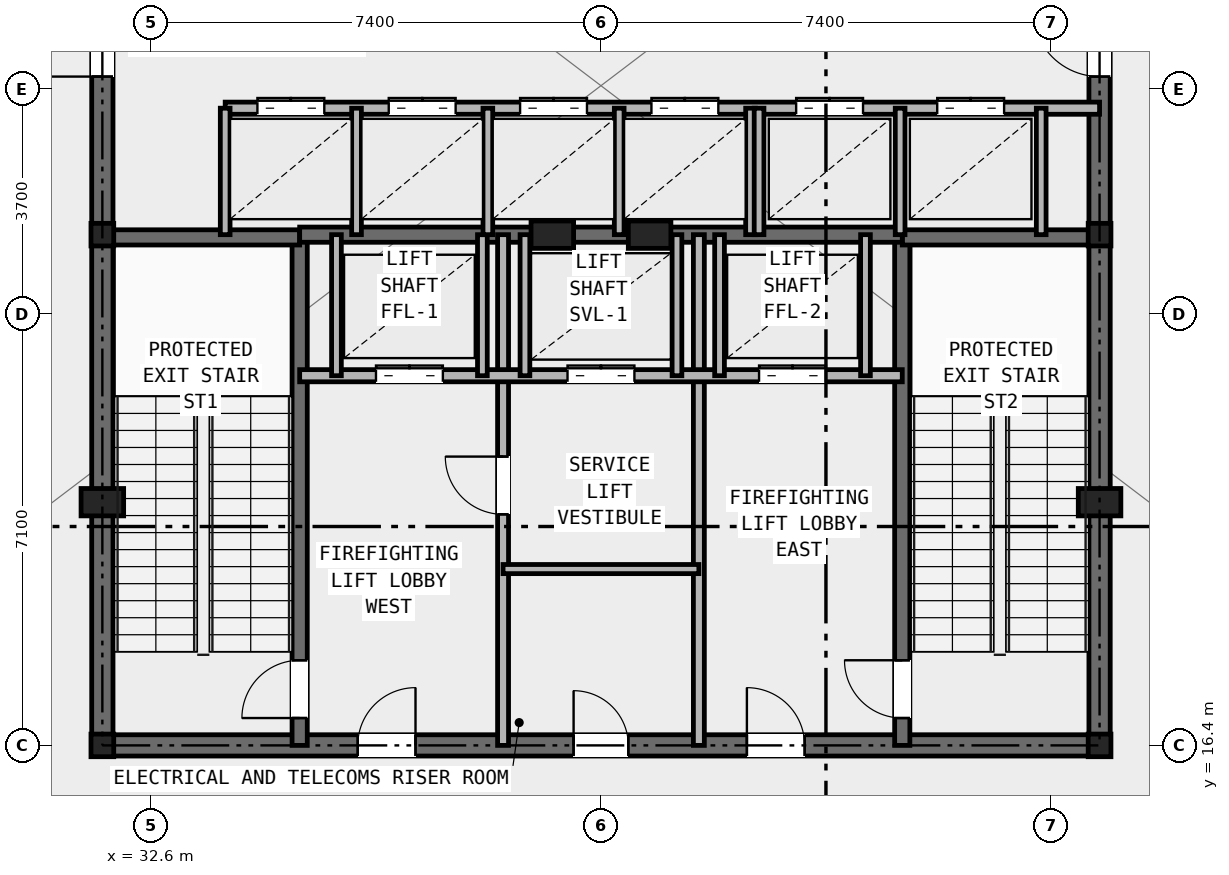
"""IFC4 building model, lengths in metres.
Left out: names, types, materials, properties, quantities, classifications, styles, units other than length and angle.
Written with IfcOpenShell. Run it as: python <this file> out.ifc"""

import sys

from ifc_helpers import new_model, si_unit, direction, frame, frame_2d, origin, origin_2d, place, context, subcontext, project, spatial, rectangle, i_section, extrude, element, fill, save


model = new_model("IFC4")
c1 = context("Model", 3, precision=1e-05, world=origin(), true_north=direction((0.0, 1.0)))
c2 = subcontext(c1, "Body", "Model", "MODEL_VIEW")
j1 = project(units=[si_unit("LENGTHUNIT", "METRE"), si_unit("PLANEANGLEUNIT", "RADIAN")], contexts=[c1])
p1 = place(None, origin())
s1 = spatial("IfcSite", under=j1, at=p1, CompositionType="ELEMENT")
p2 = place(p1, origin())
s2 = spatial("IfcBuilding", under=s1, at=p2, CompositionType="ELEMENT")
p3 = place(p2, origin())
s3 = spatial("IfcBuildingStorey", under=s2, at=p3, CompositionType="ELEMENT", Elevation=0.0)
for number, where, z_axis, x_axis in (
    (1, (31.8, 16.4, 0.0), (0.0, 0.0, 1.0), (1.0, 0.0, 0.0)),
    (2, (48.2, 16.4, 0.0), (0.0, 0.0, 1.0), (1.0, 0.0, 0.0)),
    (3, (31.8, 24.8, 0.0), (0.0, 0.0, 1.0), (1.0, 0.0, 0.0)),
    (4, (48.2, 24.8, 0.0), (0.0, 0.0, 1.0), (1.0, 0.0, 0.0)),
):
    element("IfcColumn", number, at=place(p3, frame(where, z_axis=z_axis, x_axis=x_axis)), inside=s3, PredefinedType="COLUMN", context=c2, shape_type="SweptSolid", body=[
        extrude(i_section(OverallWidth=0.374, OverallDepth=0.372, WebThickness=0.016, FlangeThickness=0.026, at=origin_2d()), origin(), (0.0, 0.0, 1.0), 5.5),
    ])
for number, where, z_axis, x_axis in (
    (5, (31.8, 20.4, 0.0), (0.0, 0.0, 1.0), (1.0, 0.0, 0.0)),
    (6, (48.2, 20.4, 0.0), (0.0, 0.0, 1.0), (1.0, 0.0, 0.0)),
    (7, (39.2, 24.8, 0.0), (0.0, 0.0, 1.0), (1.0, 0.0, 0.0)),
    (8, (40.8, 24.8, 0.0), (0.0, 0.0, 1.0), (1.0, 0.0, 0.0)),
):
    element("IfcColumn", number, at=place(p3, frame(where, z_axis=z_axis, x_axis=x_axis)), inside=s3, PredefinedType="PILASTER", context=c2, shape_type="SweptSolid", body=[
        extrude(rectangle(XDim=0.7, YDim=0.45, at=origin_2d()), origin(), (0.0, 0.0, 1.0), 5.5),
    ])
p4 = place(p3, frame((31.8, 16.4, 0.0), z_axis=(0.0, 0.0, 1.0), x_axis=(1.0, 0.0, 0.0)))
e9 = element("IfcWall", 9, at=p4, inside=s3, PredefinedType="SHEAR", context=c2, shape_type="SweptSolid", body=[
    extrude(rectangle(XDim=16.4, YDim=0.35, at=frame_2d((8.2, 0.0))), origin(), (0.0, 0.0, 1.0), 5.22),
])
p5 = place(p4, frame((7.75, 0.0, 0.0)))
e10 = element("IfcOpeningElement", 10, at=p5, cuts=e9, PredefinedType="OPENING", context=c2, shape_type="SweptSolid", body=[
    extrude(rectangle(XDim=0.9, YDim=2.1, at=frame_2d((0.45, 1.05))), frame((0.0, 0.185, 0.0), z_axis=(0.0, -1.0, 0.0), x_axis=(1.0, 0.0, 0.0)), (0.0, 0.0, 1.0), 0.37),
])
p6 = place(p4, frame((4.2, 0.0, 0.0)))
e11 = element("IfcOpeningElement", 11, at=p6, cuts=e9, PredefinedType="OPENING", context=c2, shape_type="SweptSolid", body=[
    extrude(rectangle(XDim=0.95, YDim=2.1, at=frame_2d((0.475, 1.05))), frame((0.0, 0.185, 0.0), z_axis=(0.0, -1.0, 0.0), x_axis=(1.0, 0.0, 0.0)), (0.0, 0.0, 1.0), 0.37),
])
p7 = place(p4, frame((10.6, 0.0, 0.0)))
e12 = element("IfcOpeningElement", 12, at=p7, cuts=e9, PredefinedType="OPENING", context=c2, shape_type="SweptSolid", body=[
    extrude(rectangle(XDim=0.95, YDim=2.1, at=frame_2d((0.475, 1.05))), frame((0.0, 0.185, 0.0), z_axis=(0.0, -1.0, 0.0), x_axis=(1.0, 0.0, 0.0)), (0.0, 0.0, 1.0), 0.37),
])
p8 = place(p3, frame((31.8, 16.4, 0.0), z_axis=(0.0, 0.0, 1.0), x_axis=(0.0, 1.0, 0.0)))
e13 = element("IfcWall", 13, at=p8, inside=s3, PredefinedType="SHEAR", context=c2, shape_type="SweptSolid", body=[
    extrude(rectangle(XDim=14.8, YDim=0.35, at=frame_2d((7.4, 0.0))), origin(), (0.0, 0.0, 1.0), 5.22),
])
p9 = place(p8, frame((11.0, 0.0, 0.0)))
e14 = element("IfcOpeningElement", 14, at=p9, cuts=e13, PredefinedType="OPENING", context=c2, shape_type="SweptSolid", body=[
    extrude(rectangle(XDim=1.1, YDim=2.15, at=frame_2d((0.55, 1.075))), frame((0.0, 0.185, 0.0), z_axis=(0.0, -1.0, 0.0), x_axis=(1.0, 0.0, 0.0)), (0.0, 0.0, 1.0), 0.37),
])
p10 = place(p3, frame((48.2, 16.4, 0.0), z_axis=(0.0, 0.0, 1.0), x_axis=(0.0, 1.0, 0.0)))
e15 = element("IfcWall", 15, at=p10, inside=s3, PredefinedType="SHEAR", context=c2, shape_type="SweptSolid", body=[
    extrude(rectangle(XDim=14.8, YDim=0.35, at=frame_2d((7.4, 0.0))), origin(), (0.0, 0.0, 1.0), 5.22),
])
p11 = place(p10, frame((11.0, 0.0, 0.0)))
e16 = element("IfcOpeningElement", 16, at=p11, cuts=e15, PredefinedType="OPENING", context=c2, shape_type="SweptSolid", body=[
    extrude(rectangle(XDim=1.1, YDim=2.15, at=frame_2d((0.55, 1.075))), frame((0.0, 0.185, 0.0), z_axis=(0.0, -1.0, 0.0), x_axis=(1.0, 0.0, 0.0)), (0.0, 0.0, 1.0), 0.37),
])
p12 = place(p3, frame((35.045, 16.4, 0.0), z_axis=(0.0, 0.0, 1.0), x_axis=(0.0, 1.0, 0.0)))
e17 = element("IfcWall", 17, at=p12, inside=s3, PredefinedType="SHEAR", context=c2, shape_type="SweptSolid", body=[
    extrude(rectangle(XDim=8.4, YDim=0.25, at=frame_2d((4.2, 0.0))), origin(), (0.0, 0.0, 1.0), 5.22),
])
p13 = place(p12, frame((0.45, 0.0, 0.0)))
e18 = element("IfcOpeningElement", 18, at=p13, cuts=e17, PredefinedType="OPENING", context=c2, shape_type="SweptSolid", body=[
    extrude(rectangle(XDim=0.95, YDim=2.1, at=frame_2d((0.475, 1.05))), frame((0.0, 0.135, 0.0), z_axis=(0.0, -1.0, 0.0), x_axis=(1.0, 0.0, 0.0)), (0.0, 0.0, 1.0), 0.27),
])
p14 = place(p3, frame((31.8, 24.755, 0.0), z_axis=(0.0, 0.0, 1.0), x_axis=(1.0, 0.0, 0.0)))
e19 = element("IfcWall", 19, at=p14, inside=s3, PredefinedType="SHEAR", context=c2, shape_type="SweptSolid", body=[
    extrude(rectangle(XDim=3.245, YDim=0.25, at=frame_2d((1.623, 0.0))), origin(), (0.0, 0.0, 1.0), 5.22),
])
p15 = place(p3, frame((44.955, 16.4, 0.0), z_axis=(0.0, 0.0, 1.0), x_axis=(0.0, 1.0, 0.0)))
e20 = element("IfcWall", 20, at=p15, inside=s3, PredefinedType="SHEAR", context=c2, shape_type="SweptSolid", body=[
    extrude(rectangle(XDim=8.4, YDim=0.25, at=frame_2d((4.2, 0.0))), origin(), (0.0, 0.0, 1.0), 5.22),
])
p16 = place(p15, frame((0.45, 0.0, 0.0)))
e21 = element("IfcOpeningElement", 21, at=p16, cuts=e20, PredefinedType="OPENING", context=c2, shape_type="SweptSolid", body=[
    extrude(rectangle(XDim=0.95, YDim=2.1, at=frame_2d((0.475, 1.05))), frame((0.0, 0.135, 0.0), z_axis=(0.0, -1.0, 0.0), x_axis=(1.0, 0.0, 0.0)), (0.0, 0.0, 1.0), 0.27),
])
p17 = place(p3, frame((44.955, 24.755, 0.0), z_axis=(0.0, 0.0, 1.0), x_axis=(1.0, 0.0, 0.0)))
e22 = element("IfcWall", 22, at=p17, inside=s3, PredefinedType="SHEAR", context=c2, shape_type="SweptSolid", body=[
    extrude(rectangle(XDim=3.245, YDim=0.25, at=frame_2d((1.623, 0.0))), origin(), (0.0, 0.0, 1.0), 5.22),
])
p18 = place(p3, frame((35.045, 24.8, 0.0), z_axis=(0.0, 0.0, 1.0), x_axis=(1.0, 0.0, 0.0)))
e23 = element("IfcWall", 23, at=p18, inside=s3, PredefinedType="SHEAR", context=c2, shape_type="SweptSolid", body=[
    extrude(rectangle(XDim=9.91, YDim=0.25, at=frame_2d((4.955, 0.0))), origin(), (0.0, 0.0, 1.0), 5.22),
])
p19 = place(p3, frame((38.39, 16.4, 0.0), z_axis=(0.0, 0.0, 1.0), x_axis=(0.0, 1.0, 0.0)))
e24 = element("IfcWall", 24, at=p19, inside=s3, PredefinedType="PARTITIONING", context=c2, shape_type="SweptSolid", body=[
    extrude(rectangle(XDim=8.4, YDim=0.18, at=frame_2d((4.2, 0.0))), origin(), (0.0, 0.0, 1.0), 4.671),
])
p20 = place(p19, frame((3.8, 0.0, 0.0)))
e25 = element("IfcOpeningElement", 25, at=p20, cuts=e24, PredefinedType="OPENING", context=c2, shape_type="SweptSolid", body=[
    extrude(rectangle(XDim=0.95, YDim=2.1, at=frame_2d((0.475, 1.05))), frame((0.0, 0.1, 0.0), z_axis=(0.0, -1.0, 0.0), x_axis=(1.0, 0.0, 0.0)), (0.0, 0.0, 1.0), 0.2),
])
p21 = place(p3, frame((41.61, 16.4, 0.0), z_axis=(0.0, 0.0, 1.0), x_axis=(0.0, 1.0, 0.0)))
e26 = element("IfcWall", 26, at=p21, inside=s3, PredefinedType="PARTITIONING", context=c2, shape_type="SweptSolid", body=[
    extrude(rectangle(XDim=8.4, YDim=0.18, at=frame_2d((4.2, 0.0))), origin(), (0.0, 0.0, 1.0), 4.671),
])
p22 = place(p3, frame((35.045, 22.48, 0.0), z_axis=(0.0, 0.0, 1.0), x_axis=(1.0, 0.0, 0.0)))
e27 = element("IfcWall", 27, at=p22, inside=s3, PredefinedType="SOLIDWALL", context=c2, shape_type="SweptSolid", body=[
    extrude(rectangle(XDim=9.91, YDim=0.2, at=frame_2d((4.955, 0.0))), origin(), (0.0, 0.0, 1.0), 5.22),
])
p23 = place(p22, frame((1.255, 0.0, 0.0)))
e28 = element("IfcOpeningElement", 28, at=p23, cuts=e27, PredefinedType="OPENING", context=c2, shape_type="SweptSolid", body=[
    extrude(rectangle(XDim=1.1, YDim=2.15, at=frame_2d((0.55, 1.075))), frame((0.0, 0.11, 0.0), z_axis=(0.0, -1.0, 0.0), x_axis=(1.0, 0.0, 0.0)), (0.0, 0.0, 1.0), 0.22),
])
p24 = place(p22, frame((7.555, 0.0, 0.0)))
e29 = element("IfcOpeningElement", 29, at=p24, cuts=e27, PredefinedType="OPENING", context=c2, shape_type="SweptSolid", body=[
    extrude(rectangle(XDim=1.1, YDim=2.15, at=frame_2d((0.55, 1.075))), frame((0.0, 0.11, 0.0), z_axis=(0.0, -1.0, 0.0), x_axis=(1.0, 0.0, 0.0)), (0.0, 0.0, 1.0), 0.22),
])
p25 = place(p22, frame((4.405, 0.0, 0.0)))
e30 = element("IfcOpeningElement", 30, at=p25, cuts=e27, PredefinedType="OPENING", context=c2, shape_type="SweptSolid", body=[
    extrude(rectangle(XDim=1.1, YDim=2.15, at=frame_2d((0.55, 1.075))), frame((0.0, 0.11, 0.0), z_axis=(0.0, -1.0, 0.0), x_axis=(1.0, 0.0, 0.0)), (0.0, 0.0, 1.0), 0.22),
])
p26 = place(p3, frame((38.39, 19.3, 0.0), z_axis=(0.0, 0.0, 1.0), x_axis=(1.0, 0.0, 0.0)))
e31 = element("IfcWall", 31, at=p26, inside=s3, PredefinedType="PARTITIONING", context=c2, shape_type="SweptSolid", body=[
    extrude(rectangle(XDim=3.22, YDim=0.15, at=frame_2d((1.61, 0.0))), origin(), (0.0, 0.0, 1.0), 5.22),
])
for number, where, z_axis, x_axis in (
    (32, (35.65, 22.48, 0.0), (0.0, 0.0, 1.0), (0.0, 1.0, 0.0)),
    (33, (38.05, 22.48, 0.0), (0.0, 0.0, 1.0), (0.0, 1.0, 0.0)),
    (34, (41.95, 22.48, 0.0), (0.0, 0.0, 1.0), (0.0, 1.0, 0.0)),
    (35, (44.35, 22.48, 0.0), (0.0, 0.0, 1.0), (0.0, 1.0, 0.0)),
    (36, (38.75, 22.48, 0.0), (0.0, 0.0, 1.0), (0.0, 1.0, 0.0)),
    (37, (41.25, 22.48, 0.0), (0.0, 0.0, 1.0), (0.0, 1.0, 0.0)),
):
    element("IfcWall", number, at=place(p3, frame(where, z_axis=z_axis, x_axis=x_axis)), inside=s3, PredefinedType="SOLIDWALL", context=c2, shape_type="SweptSolid", body=[
        extrude(rectangle(XDim=2.32, YDim=0.16, at=frame_2d((1.16, 0.0))), origin(), (0.0, 0.0, 1.0), 5.22),
    ])
p27 = place(p3, frame((33.82, 26.88, 0.0), z_axis=(0.0, 0.0, 1.0), x_axis=(1.0, 0.0, 0.0)))
e38 = element("IfcWall", 38, at=p27, inside=s3, PredefinedType="SOLIDWALL", context=c2, shape_type="SweptSolid", body=[
    extrude(rectangle(XDim=14.38, YDim=0.2, at=frame_2d((7.19, 0.0))), origin(), (0.0, 0.0, 1.0), 4.671),
])
p28 = place(p27, frame((0.53, 0.0, 0.0)))
e39 = element("IfcOpeningElement", 39, at=p28, cuts=e38, PredefinedType="OPENING", context=c2, shape_type="SweptSolid", body=[
    extrude(rectangle(XDim=1.1, YDim=2.15, at=frame_2d((0.55, 1.075))), frame((0.0, 0.11, 0.0), z_axis=(0.0, -1.0, 0.0), x_axis=(1.0, 0.0, 0.0)), (0.0, 0.0, 1.0), 0.22),
])
p29 = place(p27, frame((2.69, 0.0, 0.0)))
e40 = element("IfcOpeningElement", 40, at=p29, cuts=e38, PredefinedType="OPENING", context=c2, shape_type="SweptSolid", body=[
    extrude(rectangle(XDim=1.1, YDim=2.15, at=frame_2d((0.55, 1.075))), frame((0.0, 0.11, 0.0), z_axis=(0.0, -1.0, 0.0), x_axis=(1.0, 0.0, 0.0)), (0.0, 0.0, 1.0), 0.22),
])
p30 = place(p27, frame((4.85, 0.0, 0.0)))
e41 = element("IfcOpeningElement", 41, at=p30, cuts=e38, PredefinedType="OPENING", context=c2, shape_type="SweptSolid", body=[
    extrude(rectangle(XDim=1.1, YDim=2.15, at=frame_2d((0.55, 1.075))), frame((0.0, 0.11, 0.0), z_axis=(0.0, -1.0, 0.0), x_axis=(1.0, 0.0, 0.0)), (0.0, 0.0, 1.0), 0.22),
])
p31 = place(p27, frame((7.01, 0.0, 0.0)))
e42 = element("IfcOpeningElement", 42, at=p31, cuts=e38, PredefinedType="OPENING", context=c2, shape_type="SweptSolid", body=[
    extrude(rectangle(XDim=1.1, YDim=2.15, at=frame_2d((0.55, 1.075))), frame((0.0, 0.11, 0.0), z_axis=(0.0, -1.0, 0.0), x_axis=(1.0, 0.0, 0.0)), (0.0, 0.0, 1.0), 0.22),
])
p32 = place(p27, frame((9.39, 0.0, 0.0)))
e43 = element("IfcOpeningElement", 43, at=p32, cuts=e38, PredefinedType="OPENING", context=c2, shape_type="SweptSolid", body=[
    extrude(rectangle(XDim=1.1, YDim=2.15, at=frame_2d((0.55, 1.075))), frame((0.0, 0.11, 0.0), z_axis=(0.0, -1.0, 0.0), x_axis=(1.0, 0.0, 0.0)), (0.0, 0.0, 1.0), 0.22),
])
p33 = place(p27, frame((11.71, 0.0, 0.0)))
e44 = element("IfcOpeningElement", 44, at=p33, cuts=e38, PredefinedType="OPENING", context=c2, shape_type="SweptSolid", body=[
    extrude(rectangle(XDim=1.1, YDim=2.15, at=frame_2d((0.55, 1.075))), frame((0.0, 0.11, 0.0), z_axis=(0.0, -1.0, 0.0), x_axis=(1.0, 0.0, 0.0)), (0.0, 0.0, 1.0), 0.22),
])
for number, where, z_axis, x_axis in (
    (45, (33.82, 24.8, 0.0), (0.0, 0.0, 1.0), (0.0, 1.0, 0.0)),
    (46, (35.98, 24.8, 0.0), (0.0, 0.0, 1.0), (0.0, 1.0, 0.0)),
    (47, (38.14, 24.8, 0.0), (0.0, 0.0, 1.0), (0.0, 1.0, 0.0)),
    (48, (40.3, 24.8, 0.0), (0.0, 0.0, 1.0), (0.0, 1.0, 0.0)),
    (49, (42.46, 24.8, 0.0), (0.0, 0.0, 1.0), (0.0, 1.0, 0.0)),
    (50, (42.6, 24.8, 0.0), (0.0, 0.0, 1.0), (0.0, 1.0, 0.0)),
    (51, (44.92, 24.8, 0.0), (0.0, 0.0, 1.0), (0.0, 1.0, 0.0)),
    (52, (47.24, 24.8, 0.0), (0.0, 0.0, 1.0), (0.0, 1.0, 0.0)),
):
    element("IfcWall", number, at=place(p3, frame(where, z_axis=z_axis, x_axis=x_axis)), inside=s3, PredefinedType="SOLIDWALL", context=c2, shape_type="SweptSolid", body=[
        extrude(rectangle(XDim=2.08, YDim=0.16, at=frame_2d((1.04, 0.0))), origin(), (0.0, 0.0, 1.0), 5.22),
    ])
p34 = place(p5, origin())
e53 = element("IfcDoor", 53, at=p34, inside=s3, OperationType="SINGLE_SWING_LEFT", PredefinedType="DOOR", context=c2, shape_type="SweptSolid", body=[
    extrude(rectangle(XDim=0.9, YDim=2.1, at=frame_2d((0.45, 1.05))), frame((0.0, 0.025, 0.0), z_axis=(0.0, -1.0, 0.0), x_axis=(1.0, 0.0, 0.0)), (0.0, 0.0, 1.0), 0.05),
])
fill(e10, e53)
p35 = place(p20, origin())
e54 = element("IfcDoor", 54, at=p35, inside=s3, OperationType="SINGLE_SWING_RIGHT", PredefinedType="DOOR", context=c2, shape_type="SweptSolid", body=[
    extrude(rectangle(XDim=0.95, YDim=2.1, at=frame_2d((0.475, 1.05))), frame((0.0, 0.025, 0.0), z_axis=(0.0, -1.0, 0.0), x_axis=(1.0, 0.0, 0.0)), (0.0, 0.0, 1.0), 0.05),
])
fill(e25, e54)
p36 = place(p13, origin())
e55 = element("IfcDoor", 55, at=p36, inside=s3, OperationType="SINGLE_SWING_LEFT", PredefinedType="DOOR", context=c2, shape_type="SweptSolid", body=[
    extrude(rectangle(XDim=0.95, YDim=2.1, at=frame_2d((0.475, 1.05))), frame((0.0, 0.025, 0.0), z_axis=(0.0, -1.0, 0.0), x_axis=(1.0, 0.0, 0.0)), (0.0, 0.0, 1.0), 0.05),
])
fill(e18, e55)
p37 = place(p16, origin())
e56 = element("IfcDoor", 56, at=p37, inside=s3, OperationType="SINGLE_SWING_RIGHT", PredefinedType="DOOR", context=c2, shape_type="SweptSolid", body=[
    extrude(rectangle(XDim=0.95, YDim=2.1, at=frame_2d((0.475, 1.05))), frame((0.0, 0.025, 0.0), z_axis=(0.0, -1.0, 0.0), x_axis=(1.0, 0.0, 0.0)), (0.0, 0.0, 1.0), 0.05),
])
fill(e21, e56)
p38 = place(p6, origin())
e57 = element("IfcDoor", 57, at=p38, inside=s3, OperationType="SINGLE_SWING_RIGHT", PredefinedType="DOOR", context=c2, shape_type="SweptSolid", body=[
    extrude(rectangle(XDim=0.95, YDim=2.1, at=frame_2d((0.475, 1.05))), frame((0.0, 0.025, 0.0), z_axis=(0.0, -1.0, 0.0), x_axis=(1.0, 0.0, 0.0)), (0.0, 0.0, 1.0), 0.05),
])
fill(e11, e57)
p39 = place(p7, origin())
e58 = element("IfcDoor", 58, at=p39, inside=s3, OperationType="SINGLE_SWING_LEFT", PredefinedType="DOOR", context=c2, shape_type="SweptSolid", body=[
    extrude(rectangle(XDim=0.95, YDim=2.1, at=frame_2d((0.475, 1.05))), frame((0.0, 0.025, 0.0), z_axis=(0.0, -1.0, 0.0), x_axis=(1.0, 0.0, 0.0)), (0.0, 0.0, 1.0), 0.05),
])
fill(e12, e58)
p40 = place(p23, origin())
e59 = element("IfcDoor", 59, at=p40, inside=s3, OperationType="DOUBLE_DOOR_SLIDING", PredefinedType="DOOR", context=c2, shape_type="SweptSolid", body=[
    extrude(rectangle(XDim=1.1, YDim=2.15, at=frame_2d((0.55, 1.075))), frame((0.0, 0.025, 0.0), z_axis=(0.0, -1.0, 0.0), x_axis=(1.0, 0.0, 0.0)), (0.0, 0.0, 1.0), 0.05),
])
fill(e28, e59)
p41 = place(p24, origin())
e60 = element("IfcDoor", 60, at=p41, inside=s3, OperationType="DOUBLE_DOOR_SLIDING", PredefinedType="DOOR", context=c2, shape_type="SweptSolid", body=[
    extrude(rectangle(XDim=1.1, YDim=2.15, at=frame_2d((0.55, 1.075))), frame((0.0, 0.025, 0.0), z_axis=(0.0, -1.0, 0.0), x_axis=(1.0, 0.0, 0.0)), (0.0, 0.0, 1.0), 0.05),
])
fill(e29, e60)
p42 = place(p25, origin())
e61 = element("IfcDoor", 61, at=p42, inside=s3, OperationType="DOUBLE_DOOR_SLIDING", PredefinedType="DOOR", context=c2, shape_type="SweptSolid", body=[
    extrude(rectangle(XDim=1.1, YDim=2.15, at=frame_2d((0.55, 1.075))), frame((0.0, 0.025, 0.0), z_axis=(0.0, -1.0, 0.0), x_axis=(1.0, 0.0, 0.0)), (0.0, 0.0, 1.0), 0.05),
])
fill(e30, e61)
p43 = place(p9, origin())
e62 = element("IfcDoor", 62, at=p43, inside=s3, OperationType="SINGLE_SWING_LEFT", PredefinedType="DOOR", context=c2, shape_type="SweptSolid", body=[
    extrude(rectangle(XDim=1.1, YDim=2.15, at=frame_2d((0.55, 1.075))), frame((0.0, 0.025, 0.0), z_axis=(0.0, -1.0, 0.0), x_axis=(1.0, 0.0, 0.0)), (0.0, 0.0, 1.0), 0.05),
])
fill(e14, e62)
p44 = place(p11, origin())
e63 = element("IfcDoor", 63, at=p44, inside=s3, OperationType="SINGLE_SWING_RIGHT", PredefinedType="DOOR", context=c2, shape_type="SweptSolid", body=[
    extrude(rectangle(XDim=1.1, YDim=2.15, at=frame_2d((0.55, 1.075))), frame((0.0, 0.025, 0.0), z_axis=(0.0, -1.0, 0.0), x_axis=(1.0, 0.0, 0.0)), (0.0, 0.0, 1.0), 0.05),
])
fill(e16, e63)
p45 = place(p28, origin())
e64 = element("IfcDoor", 64, at=p45, inside=s3, OperationType="DOUBLE_DOOR_SLIDING", PredefinedType="DOOR", context=c2, shape_type="SweptSolid", body=[
    extrude(rectangle(XDim=1.1, YDim=2.15, at=frame_2d((0.55, 1.075))), frame((0.0, 0.025, 0.0), z_axis=(0.0, -1.0, 0.0), x_axis=(1.0, 0.0, 0.0)), (0.0, 0.0, 1.0), 0.05),
])
fill(e39, e64)
p46 = place(p29, origin())
e65 = element("IfcDoor", 65, at=p46, inside=s3, OperationType="DOUBLE_DOOR_SLIDING", PredefinedType="DOOR", context=c2, shape_type="SweptSolid", body=[
    extrude(rectangle(XDim=1.1, YDim=2.15, at=frame_2d((0.55, 1.075))), frame((0.0, 0.025, 0.0), z_axis=(0.0, -1.0, 0.0), x_axis=(1.0, 0.0, 0.0)), (0.0, 0.0, 1.0), 0.05),
])
fill(e40, e65)
p47 = place(p30, origin())
e66 = element("IfcDoor", 66, at=p47, inside=s3, OperationType="DOUBLE_DOOR_SLIDING", PredefinedType="DOOR", context=c2, shape_type="SweptSolid", body=[
    extrude(rectangle(XDim=1.1, YDim=2.15, at=frame_2d((0.55, 1.075))), frame((0.0, 0.025, 0.0), z_axis=(0.0, -1.0, 0.0), x_axis=(1.0, 0.0, 0.0)), (0.0, 0.0, 1.0), 0.05),
])
fill(e41, e66)
p48 = place(p31, origin())
e67 = element("IfcDoor", 67, at=p48, inside=s3, OperationType="DOUBLE_DOOR_SLIDING", PredefinedType="DOOR", context=c2, shape_type="SweptSolid", body=[
    extrude(rectangle(XDim=1.1, YDim=2.15, at=frame_2d((0.55, 1.075))), frame((0.0, 0.025, 0.0), z_axis=(0.0, -1.0, 0.0), x_axis=(1.0, 0.0, 0.0)), (0.0, 0.0, 1.0), 0.05),
])
fill(e42, e67)
p49 = place(p32, origin())
e68 = element("IfcDoor", 68, at=p49, inside=s3, OperationType="DOUBLE_DOOR_SLIDING", PredefinedType="DOOR", context=c2, shape_type="SweptSolid", body=[
    extrude(rectangle(XDim=1.1, YDim=2.15, at=frame_2d((0.55, 1.075))), frame((0.0, 0.025, 0.0), z_axis=(0.0, -1.0, 0.0), x_axis=(1.0, 0.0, 0.0)), (0.0, 0.0, 1.0), 0.05),
])
fill(e43, e68)
p50 = place(p33, origin())
e69 = element("IfcDoor", 69, at=p50, inside=s3, OperationType="DOUBLE_DOOR_SLIDING", PredefinedType="DOOR", context=c2, shape_type="SweptSolid", body=[
    extrude(rectangle(XDim=1.1, YDim=2.15, at=frame_2d((0.55, 1.075))), frame((0.0, 0.025, 0.0), z_axis=(0.0, -1.0, 0.0), x_axis=(1.0, 0.0, 0.0)), (0.0, 0.0, 1.0), 0.05),
])
fill(e44, e69)
save(model, sys.argv[1])
